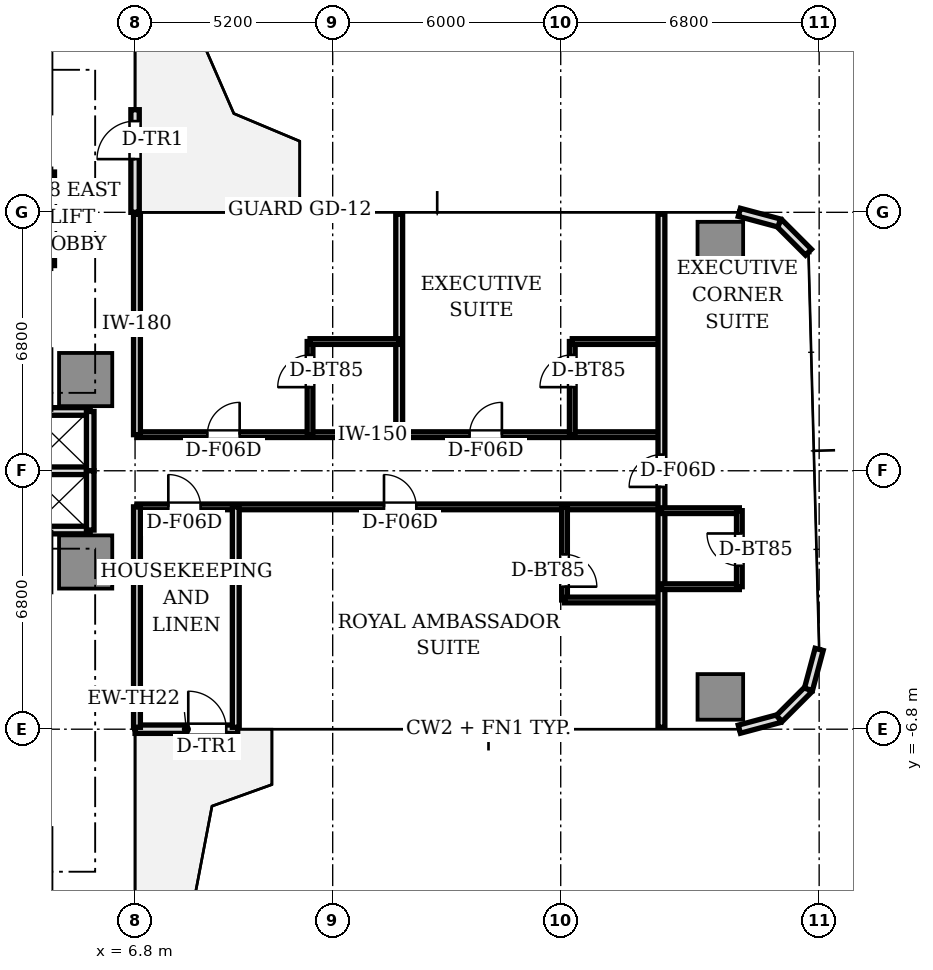
"""IFC4 building model, lengths in metres.
Left out: names, types, materials, properties, quantities, classifications, styles, units other than length and angle.
Written with IfcOpenShell. Run it as: python <this file> out.ifc"""

import sys

from ifc_helpers import new_model, si_unit, direction, frame, frame_2d, origin, origin_2d, place, context, subcontext, project, spatial, rectangle, extrude, source, transform, mapped, element, fill, save


model = new_model("IFC4")
c1 = context("Model", 3, precision=1e-05, world=origin(), true_north=direction((0.0, 1.0)))
c2 = subcontext(c1, "Body", "Model", "MODEL_VIEW")
j1 = project(units=[si_unit("LENGTHUNIT", "METRE"), si_unit("PLANEANGLEUNIT", "RADIAN")], contexts=[c1])
p1 = place(None, origin())
s1 = spatial("IfcSite", under=j1, at=p1, CompositionType="ELEMENT")
p2 = place(p1, origin())
s2 = spatial("IfcBuilding", under=s1, at=p2, CompositionType="ELEMENT")
p3 = place(p2, frame((0.0, 0.0, 33.15)))
s3 = spatial("IfcBuildingStorey", under=s2, at=p3, CompositionType="ELEMENT", Elevation=33.15)
m1 = source(origin(), c2, "Body", "SweptSolid", [
    extrude(rectangle(XDim=1.4, YDim=1.4, at=origin_2d()), origin(), (0.0, 0.0, 1.0), 3.11),
])
for number, where, z_axis, x_axis in (
    (1, (5.5, 2.4, 0.0), (0.0, 0.0, 1.0), (1.0, 0.0, 0.0)),
    (2, (5.5, -2.4, 0.0), (0.0, 0.0, 1.0), (1.0, 0.0, 0.0)),
):
    element("IfcColumn", number, at=place(p3, frame(where, z_axis=z_axis, x_axis=x_axis)), inside=s3, PredefinedType="COLUMN", context=c2, shape_type="MappedRepresentation", body=[
        mapped(m1, transform((0.0, 0.0, 0.0), scale=1.0)),
    ])
m2 = source(origin(), c2, "Body", "SweptSolid", [
    extrude(rectangle(XDim=1.2, YDim=1.2, at=origin_2d()), origin(), (0.0, 0.0, 1.0), 3.11),
])
for number, where, z_axis, x_axis in (
    (3, (22.2, -5.95, 0.0), (0.0, 0.0, 1.0), (1.0, 0.0, 0.0)),
    (4, (22.2, 5.95, 0.0), (0.0, 0.0, 1.0), (1.0, 0.0, 0.0)),
):
    element("IfcColumn", number, at=place(p3, frame(where, z_axis=z_axis, x_axis=x_axis)), inside=s3, PredefinedType="COLUMN", context=c2, shape_type="MappedRepresentation", body=[
        mapped(m2, transform((0.0, 0.0, 0.0), scale=1.0)),
    ])
p4 = place(p3, frame((6.8, -6.8, 0.0), z_axis=(0.0, 0.0, 1.0), x_axis=(1.0, 0.0, 0.0)))
e5 = element("IfcWall", 5, at=p4, inside=s3, PredefinedType="STANDARD", context=c2, shape_type="SweptSolid", body=[
    extrude(rectangle(XDim=2.7, YDim=0.22, at=frame_2d((1.35, 0.0))), origin(), (0.0, 0.0, 1.0), 3.11),
])
p5 = place(p4, frame((1.4, 0.0, 0.0)))
e6 = element("IfcOpeningElement", 6, at=p5, cuts=e5, PredefinedType="OPENING", context=c2, shape_type="SweptSolid", body=[
    extrude(rectangle(XDim=1.0, YDim=2.2, at=frame_2d((0.5, 1.1))), frame((0.0, 0.12, 0.0), z_axis=(0.0, -1.0, 0.0), x_axis=(1.0, 0.0, 0.0)), (0.0, 0.0, 1.0), 0.24),
])
for number, where, z_axis, x_axis in (
    (7, (22.7, -6.8, 0.0), (0.0, 0.0, 1.0), (0.966, 0.259, 0.0)),
    (8, (23.75, -6.519, 0.0), (0.0, 0.0, 1.0), (0.707, 0.707, 0.0)),
    (9, (24.519, -5.75, 0.0), (0.0, 0.0, 1.0), (0.259, 0.966, 0.0)),
    (10, (24.519, 5.75, 0.0), (0.0, 0.0, 1.0), (-0.707, 0.707, 0.0)),
    (11, (23.75, 6.519, 0.0), (0.0, 0.0, 1.0), (-0.966, 0.259, 0.0)),
):
    element("IfcWall", number, at=place(p3, frame(where, z_axis=z_axis, x_axis=x_axis)), inside=s3, PredefinedType="STANDARD", context=c2, shape_type="SweptSolid", body=[
        extrude(rectangle(XDim=1.087, YDim=0.22, at=frame_2d((0.543, 0.0))), origin(), (0.0, 0.0, 1.0), 3.11),
    ])
p6 = place(p3, frame((6.8, 6.8, 0.0), z_axis=(0.0, 0.0, 1.0), x_axis=(0.0, 1.0, 0.0)))
e12 = element("IfcWall", 12, at=p6, inside=s3, PredefinedType="STANDARD", context=c2, shape_type="SweptSolid", body=[
    extrude(rectangle(XDim=2.7, YDim=0.22, at=frame_2d((1.35, 0.0))), origin(), (0.0, 0.0, 1.0), 3.11),
])
p7 = place(p6, frame((1.4, 0.0, 0.0)))
e13 = element("IfcOpeningElement", 13, at=p7, cuts=e12, PredefinedType="OPENING", context=c2, shape_type="SweptSolid", body=[
    extrude(rectangle(XDim=1.0, YDim=2.2, at=frame_2d((0.5, 1.1))), frame((0.0, 0.12, 0.0), z_axis=(0.0, -1.0, 0.0), x_axis=(1.0, 0.0, 0.0)), (0.0, 0.0, 1.0), 0.24),
])
for number, where, z_axis, x_axis in (
    (14, (3.98, 1.56, 0.0), (0.0, 0.0, 1.0), (1.0, 0.0, 0.0)),
    (15, (3.98, -1.56, 0.0), (0.0, 0.0, 1.0), (1.0, 0.0, 0.0)),
    (16, (3.98, 0.0, 0.0), (0.0, 0.0, 1.0), (1.0, 0.0, 0.0)),
):
    element("IfcWall", number, at=place(p3, frame(where, z_axis=z_axis, x_axis=x_axis)), inside=s3, PredefinedType="SOLIDWALL", context=c2, shape_type="SweptSolid", body=[
        extrude(rectangle(XDim=1.64, YDim=0.2, at=frame_2d((0.82, 0.0))), origin(), (0.0, 0.0, 1.0), 2.66),
    ])
for number, where, z_axis, x_axis in (
    (17, (5.62, 0.0, 0.0), (0.0, 0.0, 1.0), (0.0, 1.0, 0.0)),
    (18, (5.62, -1.56, 0.0), (0.0, 0.0, 1.0), (0.0, 1.0, 0.0)),
):
    element("IfcWall", number, at=place(p3, frame(where, z_axis=z_axis, x_axis=x_axis)), inside=s3, PredefinedType="SOLIDWALL", context=c2, shape_type="SweptSolid", body=[
        extrude(rectangle(XDim=1.56, YDim=0.2, at=frame_2d((0.78, 0.0))), origin(), (0.0, 0.0, 1.0), 2.66),
    ])
p8 = place(p3, frame((4.58, 5.4, 0.0), z_axis=(0.0, 0.0, 1.0), x_axis=(0.0, 1.0, 0.0)))
e19 = element("IfcWall", 19, at=p8, inside=s3, PredefinedType="SOLIDWALL", context=c2, shape_type="SweptSolid", body=[
    extrude(rectangle(XDim=2.46, YDim=0.2, at=frame_2d((1.23, 0.0))), origin(), (0.0, 0.0, 1.0), 2.66),
])
p9 = place(p8, frame((0.2, 0.0, 0.0)))
e20 = element("IfcOpeningElement", 20, at=p9, cuts=e19, PredefinedType="OPENING", context=c2, shape_type="SweptSolid", body=[
    extrude(rectangle(XDim=0.85, YDim=2.1, at=frame_2d((0.425, 1.05))), frame((0.0, 0.11, 0.0), z_axis=(0.0, -1.0, 0.0), x_axis=(1.0, 0.0, 0.0)), (0.0, 0.0, 1.0), 0.22),
])
p10 = place(p8, frame((1.38, 0.0, 0.0)))
e21 = element("IfcOpeningElement", 21, at=p10, cuts=e19, PredefinedType="OPENING", context=c2, shape_type="SweptSolid", body=[
    extrude(rectangle(XDim=0.85, YDim=2.1, at=frame_2d((0.425, 1.05))), frame((0.0, 0.11, 0.0), z_axis=(0.0, -1.0, 0.0), x_axis=(1.0, 0.0, 0.0)), (0.0, 0.0, 1.0), 0.22),
])
p11 = place(p3, frame((6.85, 0.95, 0.0), z_axis=(0.0, 0.0, 1.0), x_axis=(1.0, 0.0, 0.0)))
e22 = element("IfcWall", 22, at=p11, inside=s3, PredefinedType="PARTITIONING", context=c2, shape_type="SweptSolid", body=[
    extrude(rectangle(XDim=13.8, YDim=0.15, at=frame_2d((6.9, 0.0))), origin(), (0.0, 0.0, 1.0), 2.66),
])
p12 = place(p11, frame((1.852, 0.0, 0.0)))
e23 = element("IfcOpeningElement", 23, at=p12, cuts=e22, PredefinedType="OPENING", context=c2, shape_type="SweptSolid", body=[
    extrude(rectangle(XDim=0.85, YDim=2.1, at=frame_2d((0.425, 1.05))), frame((0.0, 0.085, 0.0), z_axis=(0.0, -1.0, 0.0), x_axis=(1.0, 0.0, 0.0)), (0.0, 0.0, 1.0), 0.17),
])
p13 = place(p11, frame((8.752, 0.0, 0.0)))
e24 = element("IfcOpeningElement", 24, at=p13, cuts=e22, PredefinedType="OPENING", context=c2, shape_type="SweptSolid", body=[
    extrude(rectangle(XDim=0.85, YDim=2.1, at=frame_2d((0.425, 1.05))), frame((0.0, 0.085, 0.0), z_axis=(0.0, -1.0, 0.0), x_axis=(1.0, 0.0, 0.0)), (0.0, 0.0, 1.0), 0.17),
])
p14 = place(p3, frame((6.85, -0.95, 0.0), z_axis=(0.0, 0.0, 1.0), x_axis=(1.0, 0.0, 0.0)))
e25 = element("IfcWall", 25, at=p14, inside=s3, PredefinedType="PARTITIONING", context=c2, shape_type="SweptSolid", body=[
    extrude(rectangle(XDim=13.8, YDim=0.15, at=frame_2d((6.9, 0.0))), origin(), (0.0, 0.0, 1.0), 2.66),
])
p15 = place(p14, frame((0.825, 0.0, 0.0)))
e26 = element("IfcOpeningElement", 26, at=p15, cuts=e25, PredefinedType="OPENING", context=c2, shape_type="SweptSolid", body=[
    extrude(rectangle(XDim=0.85, YDim=2.1, at=frame_2d((0.425, 1.05))), frame((0.0, 0.085, 0.0), z_axis=(0.0, -1.0, 0.0), x_axis=(1.0, 0.0, 0.0)), (0.0, 0.0, 1.0), 0.17),
])
p16 = place(p14, frame((6.5, 0.0, 0.0)))
e27 = element("IfcOpeningElement", 27, at=p16, cuts=e25, PredefinedType="OPENING", context=c2, shape_type="SweptSolid", body=[
    extrude(rectangle(XDim=0.85, YDim=2.1, at=frame_2d((0.425, 1.05))), frame((0.0, 0.085, 0.0), z_axis=(0.0, -1.0, 0.0), x_axis=(1.0, 0.0, 0.0)), (0.0, 0.0, 1.0), 0.17),
])
for number, where, z_axis, x_axis in (
    (28, (6.85, 0.95, 0.0), (0.0, 0.0, 1.0), (0.0, 1.0, 0.0)),
    (29, (6.85, -6.75, 0.0), (0.0, 0.0, 1.0), (0.0, 1.0, 0.0)),
    (30, (13.75, 0.95, 0.0), (0.0, 0.0, 1.0), (0.0, 1.0, 0.0)),
):
    element("IfcWall", number, at=place(p3, frame(where, z_axis=z_axis, x_axis=x_axis)), inside=s3, PredefinedType="PARTITIONING", context=c2, shape_type="SweptSolid", body=[
        extrude(rectangle(XDim=5.8, YDim=0.18, at=frame_2d((2.9, 0.0))), origin(), (0.0, 0.0, 1.0), 2.66),
    ])
p17 = place(p3, frame((11.404, 0.95, 0.0), z_axis=(0.0, 0.0, 1.0), x_axis=(0.0, 1.0, 0.0)))
e31 = element("IfcWall", 31, at=p17, inside=s3, PredefinedType="PARTITIONING", context=c2, shape_type="SweptSolid", body=[
    extrude(rectangle(XDim=2.45, YDim=0.15, at=frame_2d((1.225, 0.0))), origin(), (0.0, 0.0, 1.0), 2.66),
])
p18 = place(p17, frame((1.25, 0.0, 0.0)))
e32 = element("IfcOpeningElement", 32, at=p18, cuts=e31, PredefinedType="OPENING", context=c2, shape_type="SweptSolid", body=[
    extrude(rectangle(XDim=0.85, YDim=2.1, at=frame_2d((0.425, 1.05))), frame((0.0, 0.085, 0.0), z_axis=(0.0, -1.0, 0.0), x_axis=(1.0, 0.0, 0.0)), (0.0, 0.0, 1.0), 0.17),
])
p19 = place(p3, frame((11.404, 3.4, 0.0), z_axis=(0.0, 0.0, 1.0), x_axis=(1.0, 0.0, 0.0)))
e33 = element("IfcWall", 33, at=p19, inside=s3, PredefinedType="PARTITIONING", context=c2, shape_type="SweptSolid", body=[
    extrude(rectangle(XDim=2.346, YDim=0.15, at=frame_2d((1.173, 0.0))), origin(), (0.0, 0.0, 1.0), 2.63),
])
p20 = place(p3, frame((18.304, 0.95, 0.0), z_axis=(0.0, 0.0, 1.0), x_axis=(0.0, 1.0, 0.0)))
e34 = element("IfcWall", 34, at=p20, inside=s3, PredefinedType="PARTITIONING", context=c2, shape_type="SweptSolid", body=[
    extrude(rectangle(XDim=2.45, YDim=0.15, at=frame_2d((1.225, 0.0))), origin(), (0.0, 0.0, 1.0), 2.66),
])
p21 = place(p20, frame((1.25, 0.0, 0.0)))
e35 = element("IfcOpeningElement", 35, at=p21, cuts=e34, PredefinedType="OPENING", context=c2, shape_type="SweptSolid", body=[
    extrude(rectangle(XDim=0.85, YDim=2.1, at=frame_2d((0.425, 1.05))), frame((0.0, 0.085, 0.0), z_axis=(0.0, -1.0, 0.0), x_axis=(1.0, 0.0, 0.0)), (0.0, 0.0, 1.0), 0.17),
])
p22 = place(p3, frame((18.304, 3.4, 0.0), z_axis=(0.0, 0.0, 1.0), x_axis=(1.0, 0.0, 0.0)))
e36 = element("IfcWall", 36, at=p22, inside=s3, PredefinedType="PARTITIONING", context=c2, shape_type="SweptSolid", body=[
    extrude(rectangle(XDim=2.346, YDim=0.15, at=frame_2d((1.173, 0.0))), origin(), (0.0, 0.0, 1.0), 2.63),
])
p23 = place(p3, frame((9.45, -0.95, 0.0), z_axis=(0.0, 0.0, 1.0), x_axis=(0.0, -1.0, 0.0)))
e37 = element("IfcWall", 37, at=p23, inside=s3, PredefinedType="PARTITIONING", context=c2, shape_type="SweptSolid", body=[
    extrude(rectangle(XDim=5.8, YDim=0.18, at=frame_2d((2.9, 0.0))), origin(), (0.0, 0.0, 1.0), 2.66),
])
p24 = place(p3, frame((18.1, -0.95, 0.0), z_axis=(0.0, 0.0, 1.0), x_axis=(0.0, -1.0, 0.0)))
e38 = element("IfcWall", 38, at=p24, inside=s3, PredefinedType="PARTITIONING", context=c2, shape_type="SweptSolid", body=[
    extrude(rectangle(XDim=2.45, YDim=0.15, at=frame_2d((1.225, 0.0))), origin(), (0.0, 0.0, 1.0), 2.66),
])
p25 = place(p24, frame((1.25, 0.0, 0.0)))
e39 = element("IfcOpeningElement", 39, at=p25, cuts=e38, PredefinedType="OPENING", context=c2, shape_type="SweptSolid", body=[
    extrude(rectangle(XDim=0.85, YDim=2.1, at=frame_2d((0.425, 1.05))), frame((0.0, 0.085, 0.0), z_axis=(0.0, -1.0, 0.0), x_axis=(1.0, 0.0, 0.0)), (0.0, 0.0, 1.0), 0.17),
])
p26 = place(p3, frame((18.1, -3.4, 0.0), z_axis=(0.0, 0.0, 1.0), x_axis=(1.0, 0.0, 0.0)))
e40 = element("IfcWall", 40, at=p26, inside=s3, PredefinedType="PARTITIONING", context=c2, shape_type="SweptSolid", body=[
    extrude(rectangle(XDim=2.55, YDim=0.15, at=frame_2d((1.275, 0.0))), origin(), (0.0, 0.0, 1.0), 2.63),
])
p27 = place(p3, frame((20.65, -6.75, 0.0), z_axis=(0.0, 0.0, 1.0), x_axis=(0.0, 1.0, 0.0)))
e41 = element("IfcWall", 41, at=p27, inside=s3, PredefinedType="PARTITIONING", context=c2, shape_type="SweptSolid", body=[
    extrude(rectangle(XDim=13.5, YDim=0.18, at=frame_2d((6.75, 0.0))), origin(), (0.0, 0.0, 1.0), 2.66),
])
p28 = place(p27, frame((6.325, 0.0, 0.0)))
e42 = element("IfcOpeningElement", 42, at=p28, cuts=e41, PredefinedType="OPENING", context=c2, shape_type="SweptSolid", body=[
    extrude(rectangle(XDim=0.85, YDim=2.1, at=frame_2d((0.425, 1.05))), frame((0.0, 0.1, 0.0), z_axis=(0.0, -1.0, 0.0), x_axis=(1.0, 0.0, 0.0)), (0.0, 0.0, 1.0), 0.2),
])
p29 = place(p3, frame((20.65, -1.05, 0.0), z_axis=(0.0, 0.0, 1.0), x_axis=(1.0, 0.0, 0.0)))
e43 = element("IfcWall", 43, at=p29, inside=s3, PredefinedType="PARTITIONING", context=c2, shape_type="SweptSolid", body=[
    extrude(rectangle(XDim=2.05, YDim=0.15, at=frame_2d((1.025, 0.0))), origin(), (0.0, 0.0, 1.0), 2.66),
])
p30 = place(p3, frame((20.65, -3.05, 0.0), z_axis=(0.0, 0.0, 1.0), x_axis=(1.0, 0.0, 0.0)))
e44 = element("IfcWall", 44, at=p30, inside=s3, PredefinedType="PARTITIONING", context=c2, shape_type="SweptSolid", body=[
    extrude(rectangle(XDim=2.05, YDim=0.15, at=frame_2d((1.025, 0.0))), origin(), (0.0, 0.0, 1.0), 2.63),
])
p31 = place(p3, frame((22.7, -3.05, 0.0), z_axis=(0.0, 0.0, 1.0), x_axis=(0.0, 1.0, 0.0)))
e45 = element("IfcWall", 45, at=p31, inside=s3, PredefinedType="PARTITIONING", context=c2, shape_type="SweptSolid", body=[
    extrude(rectangle(XDim=2.0, YDim=0.15, at=frame_2d((1.0, 0.0))), origin(), (0.0, 0.0, 1.0), 2.66),
])
p32 = place(p31, frame((0.55, 0.0, 0.0)))
e46 = element("IfcOpeningElement", 46, at=p32, cuts=e45, PredefinedType="OPENING", context=c2, shape_type="SweptSolid", body=[
    extrude(rectangle(XDim=0.85, YDim=2.1, at=frame_2d((0.425, 1.05))), frame((0.0, 0.085, 0.0), z_axis=(0.0, -1.0, 0.0), x_axis=(1.0, 0.0, 0.0)), (0.0, 0.0, 1.0), 0.17),
])
m3 = source(origin(), c2, "Body", "SweptSolid", [
    extrude(rectangle(XDim=1.0, YDim=0.05, at=origin_2d()), origin(), (0.0, 0.0, 1.0), 2.2),
])
p33 = place(p5, frame((0.5, 0.0, 0.0)))
e47 = element("IfcDoor", 47, at=p33, inside=s3, OperationType="SINGLE_SWING_LEFT", PredefinedType="DOOR", context=c2, shape_type="MappedRepresentation", body=[
    mapped(m3, transform((0.0, 0.0, 0.0), scale=1.0)),
])
fill(e6, e47)
p34 = place(p7, frame((0.5, 0.0, 0.0)))
e48 = element("IfcDoor", 48, at=p34, inside=s3, OperationType="SINGLE_SWING_LEFT", PredefinedType="DOOR", context=c2, shape_type="MappedRepresentation", body=[
    mapped(m3, transform((0.0, 0.0, 0.0), scale=1.0)),
])
fill(e13, e48)
m4 = source(origin(), c2, "Body", "SweptSolid", [
    extrude(rectangle(XDim=0.85, YDim=0.05, at=origin_2d()), origin(), (0.0, 0.0, 1.0), 2.1),
])
p35 = place(p18, frame((0.425, 0.0, 0.0)))
e49 = element("IfcDoor", 49, at=p35, inside=s3, OperationType="SINGLE_SWING_LEFT", PredefinedType="DOOR", context=c2, shape_type="MappedRepresentation", body=[
    mapped(m4, transform((0.0, 0.0, 0.0), scale=1.0)),
])
fill(e32, e49)
p36 = place(p12, frame((0.425, 0.0, 0.0)))
e50 = element("IfcDoor", 50, at=p36, inside=s3, OperationType="SINGLE_SWING_RIGHT", PredefinedType="DOOR", context=c2, shape_type="MappedRepresentation", body=[
    mapped(m4, transform((0.0, 0.0, 0.0), scale=1.0)),
])
fill(e23, e50)
p37 = place(p21, frame((0.425, 0.0, 0.0)))
e51 = element("IfcDoor", 51, at=p37, inside=s3, OperationType="SINGLE_SWING_LEFT", PredefinedType="DOOR", context=c2, shape_type="MappedRepresentation", body=[
    mapped(m4, transform((0.0, 0.0, 0.0), scale=1.0)),
])
fill(e35, e51)
p38 = place(p13, frame((0.425, 0.0, 0.0)))
e52 = element("IfcDoor", 52, at=p38, inside=s3, OperationType="SINGLE_SWING_RIGHT", PredefinedType="DOOR", context=c2, shape_type="MappedRepresentation", body=[
    mapped(m4, transform((0.0, 0.0, 0.0), scale=1.0)),
])
fill(e24, e52)
p39 = place(p15, frame((0.425, 0.0, 0.0)))
e53 = element("IfcDoor", 53, at=p39, inside=s3, OperationType="SINGLE_SWING_LEFT", PredefinedType="DOOR", context=c2, shape_type="MappedRepresentation", body=[
    mapped(m4, transform((0.0, 0.0, 0.0), scale=1.0)),
])
fill(e26, e53)
p40 = place(p25, frame((0.425, 0.0, 0.0)))
e54 = element("IfcDoor", 54, at=p40, inside=s3, OperationType="SINGLE_SWING_RIGHT", PredefinedType="DOOR", context=c2, shape_type="MappedRepresentation", body=[
    mapped(m4, transform((0.0, 0.0, 0.0), scale=1.0)),
])
fill(e39, e54)
p41 = place(p16, frame((0.425, 0.0, 0.0)))
e55 = element("IfcDoor", 55, at=p41, inside=s3, OperationType="SINGLE_SWING_LEFT", PredefinedType="DOOR", context=c2, shape_type="MappedRepresentation", body=[
    mapped(m4, transform((0.0, 0.0, 0.0), scale=1.0)),
])
fill(e27, e55)
p42 = place(p32, frame((0.425, 0.0, 0.0)))
e56 = element("IfcDoor", 56, at=p42, inside=s3, OperationType="SINGLE_SWING_RIGHT", PredefinedType="DOOR", context=c2, shape_type="MappedRepresentation", body=[
    mapped(m4, transform((0.0, 0.0, 0.0), scale=1.0)),
])
fill(e46, e56)
p43 = place(p28, frame((0.425, 0.0, 0.0)))
e57 = element("IfcDoor", 57, at=p43, inside=s3, OperationType="SINGLE_SWING_LEFT", PredefinedType="DOOR", context=c2, shape_type="MappedRepresentation", body=[
    mapped(m4, transform((0.0, 0.0, 0.0), scale=1.0)),
])
fill(e42, e57)
save(model, sys.argv[1])
